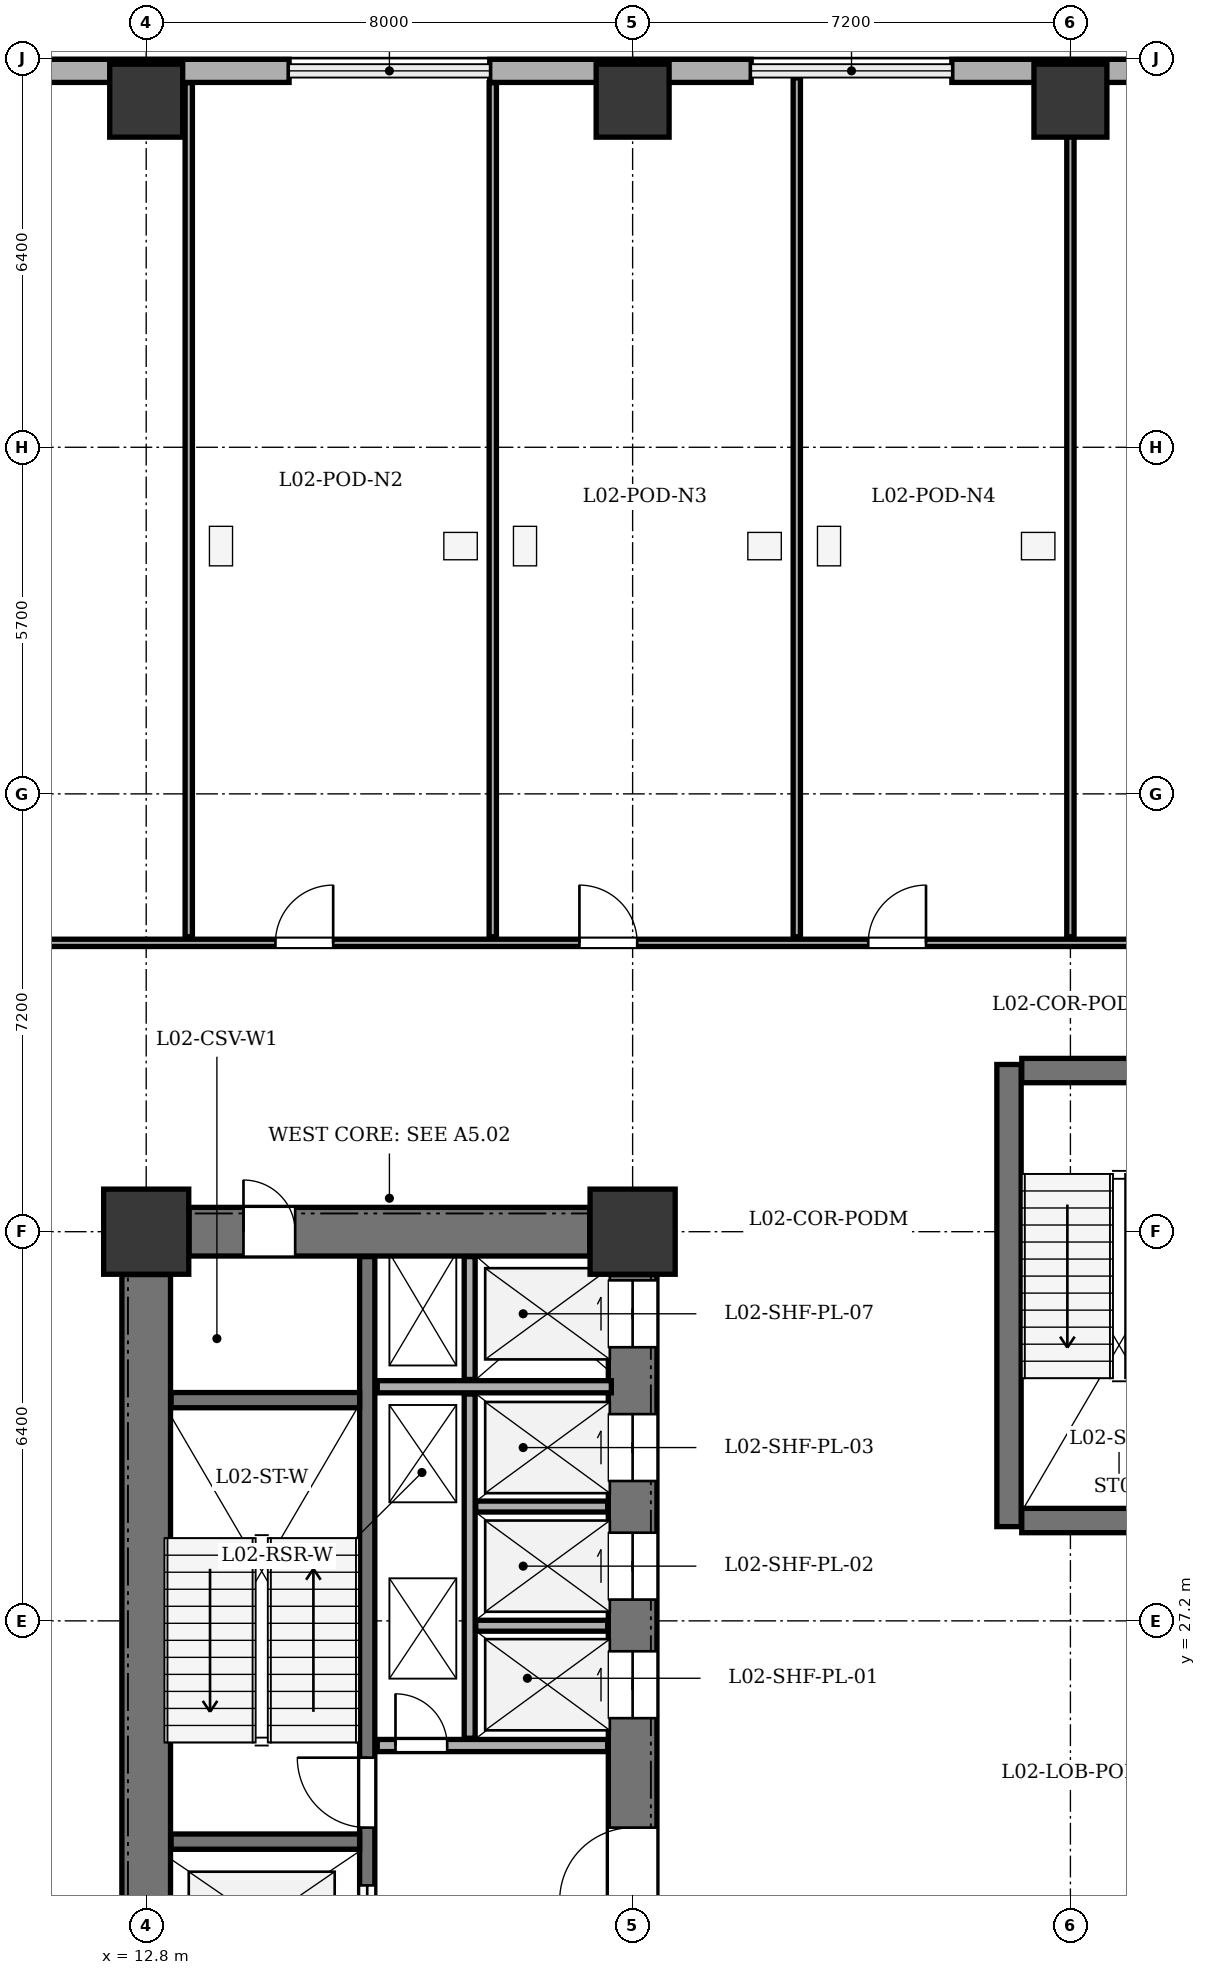
"""IFC4 building model, lengths in metres.
Left out: names, types, materials, properties, quantities, classifications, styles, units other than length and angle.
Written with IfcOpenShell. Run it as: python <this file> out.ifc"""

import sys

from ifc_helpers import new_model, si_unit, direction, frame, frame_2d, origin, origin_2d, place, context, subcontext, project, spatial, rectangle, extrude, element, fill, save


model = new_model("IFC4")
c1 = context("Model", 3, precision=1e-05, world=origin(), true_north=direction((0.0, 1.0)))
c2 = subcontext(c1, "Body", "Model", "MODEL_VIEW")
j1 = project(units=[si_unit("LENGTHUNIT", "METRE"), si_unit("PLANEANGLEUNIT", "RADIAN")], contexts=[c1])
p1 = place(None, origin())
s1 = spatial("IfcSite", under=j1, at=p1, CompositionType="ELEMENT")
p2 = place(p1, origin())
s2 = spatial("IfcBuilding", under=s1, at=p2, CompositionType="ELEMENT")
p3 = place(p2, frame((0.0, 0.0, 9.9)))
s3 = spatial("IfcBuildingStorey", under=s2, at=p3, CompositionType="ELEMENT", Elevation=9.9)
for number, where, z_axis, x_axis in (
    (1, (12.8, 33.6, 0.0), (0.0, 0.0, 1.0), (1.0, 0.0, 0.0)),
    (2, (20.8, 33.6, 0.0), (0.0, 0.0, 1.0), (1.0, 0.0, 0.0)),
):
    element("IfcColumn", number, at=place(p3, frame(where, z_axis=z_axis, x_axis=x_axis)), inside=s3, PredefinedType="COLUMN", context=c2, shape_type="SweptSolid", body=[
        extrude(rectangle(XDim=1.4, YDim=1.4, at=origin_2d()), origin(), (0.0, 0.0, 1.0), 4.5),
    ])
for number, where, z_axis, x_axis in (
    (3, (12.8, 52.2, 0.0), (0.0, 0.0, 1.0), (1.0, 0.0, 0.0)),
    (4, (20.8, 52.2, 0.0), (0.0, 0.0, 1.0), (1.0, 0.0, 0.0)),
    (5, (28.0, 52.2, 0.0), (0.0, 0.0, 1.0), (1.0, 0.0, 0.0)),
):
    element("IfcColumn", number, at=place(p3, frame(where, z_axis=z_axis, x_axis=x_axis)), inside=s3, PredefinedType="COLUMN", context=c2, shape_type="SweptSolid", body=[
        extrude(rectangle(XDim=1.2, YDim=1.2, at=origin_2d()), origin(), (0.0, 0.0, 1.0), 4.5),
    ])
p4 = place(p3, frame((5.4, 52.69, 0.0), z_axis=(0.0, 0.0, 1.0), x_axis=(1.0, 0.0, 0.0)))
e6 = element("IfcWall", 6, at=p4, inside=s3, PredefinedType="STANDARD", context=c2, shape_type="SweptSolid", body=[
    extrude(rectangle(XDim=9.75, YDim=0.38, at=frame_2d((4.875, 0.0))), origin(), (0.0, 0.0, 1.0), 4.18),
])
p5 = place(p3, frame((18.45, 52.69, 0.0), z_axis=(0.0, 0.0, 1.0), x_axis=(1.0, 0.0, 0.0)))
e7 = element("IfcWall", 7, at=p5, inside=s3, PredefinedType="STANDARD", context=c2, shape_type="SweptSolid", body=[
    extrude(rectangle(XDim=4.3, YDim=0.38, at=frame_2d((2.15, 0.0))), origin(), (0.0, 0.0, 1.0), 4.18),
])
p6 = place(p3, frame((26.05, 52.69, 0.0), z_axis=(0.0, 0.0, 1.0), x_axis=(1.0, 0.0, 0.0)))
e8 = element("IfcWall", 8, at=p6, inside=s3, PredefinedType="STANDARD", context=c2, shape_type="SweptSolid", body=[
    extrude(rectangle(XDim=28.95, YDim=0.38, at=frame_2d((14.475, 0.0))), origin(), (0.0, 0.0, 1.0), 4.18),
])
p7 = place(p3, frame((12.8, 21.505, 0.0), z_axis=(0.0, 0.0, 1.0), x_axis=(0.0, 1.0, 0.0)))
e9 = element("IfcWall", 9, at=p7, inside=s3, PredefinedType="SHEAR", context=c2, shape_type="SweptSolid", body=[
    extrude(rectangle(XDim=11.39, YDim=0.8, at=frame_2d((5.695, 0.0))), origin(), (0.0, 0.0, 1.0), 4.18),
])
p8 = place(p3, frame((13.505, 33.6, 0.0), z_axis=(0.0, 0.0, 1.0), x_axis=(1.0, 0.0, 0.0)))
e10 = element("IfcWall", 10, at=p8, inside=s3, PredefinedType="SHEAR", context=c2, shape_type="SweptSolid", body=[
    extrude(rectangle(XDim=6.59, YDim=0.8, at=frame_2d((3.295, 0.0))), origin(), (0.0, 0.0, 1.0), 4.18),
])
p9 = place(p8, frame((0.895, 0.0, 0.0)))
e11 = element("IfcOpeningElement", 11, at=p9, cuts=e10, PredefinedType="OPENING", context=c2, shape_type="SweptSolid", body=[
    extrude(rectangle(XDim=0.85, YDim=2.02, at=frame_2d((0.425, 1.01))), frame((0.0, 0.41, 0.0), z_axis=(0.0, -1.0, 0.0), x_axis=(1.0, 0.0, 0.0)), (0.0, 0.0, 1.0), 0.82),
])
p10 = place(p3, frame((20.8, 21.505, 0.0), z_axis=(0.0, 0.0, 1.0), x_axis=(0.0, 1.0, 0.0)))
e12 = element("IfcWall", 12, at=p10, inside=s3, PredefinedType="SHEAR", context=c2, shape_type="SweptSolid", body=[
    extrude(rectangle(XDim=11.39, YDim=0.8, at=frame_2d((5.695, 0.0))), origin(), (0.0, 0.0, 1.0), 4.18),
])
p11 = place(p10, frame((1.095, 0.0, 0.0)))
e13 = element("IfcOpeningElement", 13, at=p11, cuts=e12, PredefinedType="OPENING", context=c2, shape_type="SweptSolid", body=[
    extrude(rectangle(XDim=1.2, YDim=2.15, at=frame_2d((0.6, 1.075))), frame((0.0, 0.41, 0.0), z_axis=(0.0, -1.0, 0.0), x_axis=(1.0, 0.0, 0.0)), (0.0, 0.0, 1.0), 0.82),
])
p12 = place(p10, frame((4.095, 0.0, 0.0)))
e14 = element("IfcOpeningElement", 14, at=p12, cuts=e12, PredefinedType="OPENING", context=c2, shape_type="SweptSolid", body=[
    extrude(rectangle(XDim=1.1, YDim=2.1, at=frame_2d((0.55, 1.05))), frame((0.0, 0.41, 0.0), z_axis=(0.0, -1.0, 0.0), x_axis=(1.0, 0.0, 0.0)), (0.0, 0.0, 1.0), 0.82),
])
p13 = place(p10, frame((6.045, 0.0, 0.0)))
e15 = element("IfcOpeningElement", 15, at=p13, cuts=e12, PredefinedType="OPENING", context=c2, shape_type="SweptSolid", body=[
    extrude(rectangle(XDim=1.1, YDim=2.1, at=frame_2d((0.55, 1.05))), frame((0.0, 0.41, 0.0), z_axis=(0.0, -1.0, 0.0), x_axis=(1.0, 0.0, 0.0)), (0.0, 0.0, 1.0), 0.82),
])
p14 = place(p10, frame((7.995, 0.0, 0.0)))
e16 = element("IfcOpeningElement", 16, at=p14, cuts=e12, PredefinedType="OPENING", context=c2, shape_type="SweptSolid", body=[
    extrude(rectangle(XDim=1.1, YDim=2.1, at=frame_2d((0.55, 1.05))), frame((0.0, 0.41, 0.0), z_axis=(0.0, -1.0, 0.0), x_axis=(1.0, 0.0, 0.0)), (0.0, 0.0, 1.0), 0.82),
])
p15 = place(p10, frame((10.195, 0.0, 0.0)))
e17 = element("IfcOpeningElement", 17, at=p15, cuts=e12, PredefinedType="OPENING", context=c2, shape_type="SweptSolid", body=[
    extrude(rectangle(XDim=1.1, YDim=2.1, at=frame_2d((0.55, 1.05))), frame((0.0, 0.41, 0.0), z_axis=(0.0, -1.0, 0.0), x_axis=(1.0, 0.0, 0.0)), (0.0, 0.0, 1.0), 0.82),
])
p16 = place(p3, frame((16.435, 21.21, 0.0), z_axis=(0.0, 0.0, 1.0), x_axis=(0.0, 1.0, 0.0)))
e18 = element("IfcWall", 18, at=p16, inside=s3, PredefinedType="SHEAR", context=c2, shape_type="SweptSolid", body=[
    extrude(rectangle(XDim=11.98, YDim=0.25, at=frame_2d((5.99, 0.0))), origin(), (0.0, 0.0, 1.0), 4.18),
])
p17 = place(p16, frame((0.44, 0.0, 0.0)))
e19 = element("IfcOpeningElement", 19, at=p17, cuts=e18, PredefinedType="OPENING", context=c2, shape_type="SweptSolid", body=[
    extrude(rectangle(XDim=1.2, YDim=2.15, at=frame_2d((0.6, 1.075))), frame((0.0, 0.135, 0.0), z_axis=(0.0, -1.0, 0.0), x_axis=(1.0, 0.0, 0.0)), (0.0, 0.0, 1.0), 0.27),
])
p18 = place(p16, frame((2.59, 0.0, 0.0)))
e20 = element("IfcOpeningElement", 20, at=p18, cuts=e18, PredefinedType="OPENING", context=c2, shape_type="SweptSolid", body=[
    extrude(rectangle(XDim=1.15, YDim=2.15, at=frame_2d((0.575, 1.075))), frame((0.0, 0.135, 0.0), z_axis=(0.0, -1.0, 0.0), x_axis=(1.0, 0.0, 0.0)), (0.0, 0.0, 1.0), 0.27),
])
for number, where, z_axis, x_axis in (
    (21, (13.21, 23.57, 0.0), (0.0, 0.0, 1.0), (1.0, 0.0, 0.0)),
    (22, (13.21, 30.83, 0.0), (0.0, 0.0, 1.0), (1.0, 0.0, 0.0)),
):
    element("IfcWall", number, at=place(p3, frame(where, z_axis=z_axis, x_axis=x_axis)), inside=s3, PredefinedType="SHEAR", context=c2, shape_type="SweptSolid", body=[
        extrude(rectangle(XDim=3.1, YDim=0.25, at=frame_2d((1.55, 0.0))), origin(), (0.0, 0.0, 1.0), 4.18),
    ])
p19 = place(p3, frame((16.6, 25.15, 0.0), z_axis=(0.0, 0.0, 1.0), x_axis=(1.0, 0.0, 0.0)))
e23 = element("IfcWall", 23, at=p19, inside=s3, PredefinedType="SOLIDWALL", context=c2, shape_type="SweptSolid", body=[
    extrude(rectangle(XDim=3.79, YDim=0.2, at=frame_2d((1.895, 0.0))), origin(), (0.0, 0.0, 1.0), 4.18),
])
p20 = place(p19, frame((0.3, 0.0, 0.0)))
e24 = element("IfcOpeningElement", 24, at=p20, cuts=e23, PredefinedType="OPENING", context=c2, shape_type="SweptSolid", body=[
    extrude(rectangle(XDim=0.85, YDim=2.02, at=frame_2d((0.425, 1.01))), frame((0.0, 0.11, 0.0), z_axis=(0.0, -1.0, 0.0), x_axis=(1.0, 0.0, 0.0)), (0.0, 0.0, 1.0), 0.22),
])
p21 = place(p3, frame((16.6, 31.05, 0.0), z_axis=(0.0, 0.0, 1.0), x_axis=(1.0, 0.0, 0.0)))
e25 = element("IfcWall", 25, at=p21, inside=s3, PredefinedType="SOLIDWALL", context=c2, shape_type="SweptSolid", body=[
    extrude(rectangle(XDim=3.85, YDim=0.2, at=frame_2d((1.925, 0.0))), origin(), (0.0, 0.0, 1.0), 4.18),
])
p22 = place(p3, frame((18.12, 25.27, 0.0), z_axis=(0.0, 0.0, 1.0), x_axis=(0.0, 1.0, 0.0)))
e26 = element("IfcWall", 26, at=p22, inside=s3, PredefinedType="PARTITIONING", context=c2, shape_type="SweptSolid", body=[
    extrude(rectangle(XDim=5.66, YDim=0.18, at=frame_2d((2.83, 0.0))), origin(), (0.0, 0.0, 1.0), 4.18),
])
p23 = place(p3, frame((18.12, 31.17, 0.0), z_axis=(0.0, 0.0, 1.0), x_axis=(0.0, 1.0, 0.0)))
e27 = element("IfcWall", 27, at=p23, inside=s3, PredefinedType="PARTITIONING", context=c2, shape_type="SweptSolid", body=[
    extrude(rectangle(XDim=2.02, YDim=0.18, at=frame_2d((1.01, 0.0))), origin(), (0.0, 0.0, 1.0), 4.18),
])
for number, where, z_axis, x_axis in (
    (28, (18.22, 27.12, 0.0), (0.0, 0.0, 1.0), (1.0, 0.0, 0.0)),
    (29, (18.22, 29.08, 0.0), (0.0, 0.0, 1.0), (1.0, 0.0, 0.0)),
):
    element("IfcWall", number, at=place(p3, frame(where, z_axis=z_axis, x_axis=x_axis)), inside=s3, PredefinedType="PARTITIONING", context=c2, shape_type="SweptSolid", body=[
        extrude(rectangle(XDim=2.17, YDim=0.18, at=frame_2d((1.085, 0.0))), origin(), (0.0, 0.0, 1.0), 4.18),
    ])
p24 = place(p3, frame((26.99, 28.75, 0.0), z_axis=(0.0, 0.0, 1.0), x_axis=(0.0, 1.0, 0.0)))
e30 = element("IfcWall", 30, at=p24, inside=s3, PredefinedType="SHEAR", context=c2, shape_type="SweptSolid", body=[
    extrude(rectangle(XDim=7.6, YDim=0.4, at=frame_2d((3.8, 0.0))), origin(), (0.0, 0.0, 1.0), 4.18),
])
for number, where, z_axis, x_axis in (
    (31, (27.2, 28.85, 0.0), (0.0, 0.0, 1.0), (1.0, 0.0, 0.0)),
    (32, (27.2, 36.25, 0.0), (0.0, 0.0, 1.0), (1.0, 0.0, 0.0)),
):
    element("IfcWall", number, at=place(p3, frame(where, z_axis=z_axis, x_axis=x_axis)), inside=s3, PredefinedType="SHEAR", context=c2, shape_type="SweptSolid", body=[
        extrude(rectangle(XDim=3.2, YDim=0.4, at=frame_2d((1.6, 0.0))), origin(), (0.0, 0.0, 1.0), 4.18),
    ])
p25 = place(p3, frame((2.805, 38.35, 0.0), z_axis=(0.0, 0.0, 1.0), x_axis=(1.0, 0.0, 0.0)))
e33 = element("IfcWall", 33, at=p25, inside=s3, PredefinedType="PARTITIONING", context=c2, shape_type="SweptSolid", body=[
    extrude(rectangle(XDim=54.79, YDim=0.12, at=frame_2d((27.395, 0.0))), origin(), (0.0, 0.0, 1.0), 4.18),
])
p26 = place(p25, frame((4.57, 0.0, 0.0)))
e34 = element("IfcOpeningElement", 34, at=p26, cuts=e33, PredefinedType="OPENING", context=c2, shape_type="SweptSolid", body=[
    extrude(rectangle(XDim=0.95, YDim=2.1, at=frame_2d((0.475, 1.05))), frame((0.0, 0.07, 0.0), z_axis=(0.0, -1.0, 0.0), x_axis=(1.0, 0.0, 0.0)), (0.0, 0.0, 1.0), 0.14),
])
p27 = place(p25, frame((12.12, 0.0, 0.0)))
e35 = element("IfcOpeningElement", 35, at=p27, cuts=e33, PredefinedType="OPENING", context=c2, shape_type="SweptSolid", body=[
    extrude(rectangle(XDim=0.95, YDim=2.1, at=frame_2d((0.475, 1.05))), frame((0.0, 0.07, 0.0), z_axis=(0.0, -1.0, 0.0), x_axis=(1.0, 0.0, 0.0)), (0.0, 0.0, 1.0), 0.14),
])
p28 = place(p25, frame((17.12, 0.0, 0.0)))
e36 = element("IfcOpeningElement", 36, at=p28, cuts=e33, PredefinedType="OPENING", context=c2, shape_type="SweptSolid", body=[
    extrude(rectangle(XDim=0.95, YDim=2.1, at=frame_2d((0.475, 1.05))), frame((0.0, 0.07, 0.0), z_axis=(0.0, -1.0, 0.0), x_axis=(1.0, 0.0, 0.0)), (0.0, 0.0, 1.0), 0.14),
])
p29 = place(p25, frame((21.87, 0.0, 0.0)))
e37 = element("IfcOpeningElement", 37, at=p29, cuts=e33, PredefinedType="OPENING", context=c2, shape_type="SweptSolid", body=[
    extrude(rectangle(XDim=0.95, YDim=2.1, at=frame_2d((0.475, 1.05))), frame((0.0, 0.07, 0.0), z_axis=(0.0, -1.0, 0.0), x_axis=(1.0, 0.0, 0.0)), (0.0, 0.0, 1.0), 0.14),
])
p30 = place(p25, frame((29.87, 0.0, 0.0)))
e38 = element("IfcOpeningElement", 38, at=p30, cuts=e33, PredefinedType="OPENING", context=c2, shape_type="SweptSolid", body=[
    extrude(rectangle(XDim=0.95, YDim=2.1, at=frame_2d((0.475, 1.05))), frame((0.0, 0.07, 0.0), z_axis=(0.0, -1.0, 0.0), x_axis=(1.0, 0.0, 0.0)), (0.0, 0.0, 1.0), 0.14),
])
p31 = place(p25, frame((40.37, 0.0, 0.0)))
e39 = element("IfcOpeningElement", 39, at=p31, cuts=e33, PredefinedType="OPENING", context=c2, shape_type="SweptSolid", body=[
    extrude(rectangle(XDim=0.95, YDim=2.1, at=frame_2d((0.475, 1.05))), frame((0.0, 0.07, 0.0), z_axis=(0.0, -1.0, 0.0), x_axis=(1.0, 0.0, 0.0)), (0.0, 0.0, 1.0), 0.14),
])
p32 = place(p25, frame((49.12, 0.0, 0.0)))
e40 = element("IfcOpeningElement", 40, at=p32, cuts=e33, PredefinedType="OPENING", context=c2, shape_type="SweptSolid", body=[
    extrude(rectangle(XDim=0.95, YDim=2.1, at=frame_2d((0.475, 1.05))), frame((0.0, 0.07, 0.0), z_axis=(0.0, -1.0, 0.0), x_axis=(1.0, 0.0, 0.0)), (0.0, 0.0, 1.0), 0.14),
])
for number, where, z_axis, x_axis in (
    (41, (13.5, 38.45, 0.0), (0.0, 0.0, 1.0), (0.0, 1.0, 0.0)),
    (42, (18.5, 38.45, 0.0), (0.0, 0.0, 1.0), (0.0, 1.0, 0.0)),
):
    element("IfcWall", number, at=place(p3, frame(where, z_axis=z_axis, x_axis=x_axis)), inside=s3, PredefinedType="PARTITIONING", context=c2, shape_type="SweptSolid", body=[
        extrude(rectangle(XDim=14.045, YDim=0.12, at=frame_2d((7.022, 0.0))), origin(), (0.0, 0.0, 1.0), 4.18),
    ])
p33 = place(p3, frame((23.5, 38.45, 0.0), z_axis=(0.0, 0.0, 1.0), x_axis=(0.0, 1.0, 0.0)))
e43 = element("IfcWall", 43, at=p33, inside=s3, PredefinedType="PARTITIONING", context=c2, shape_type="SweptSolid", body=[
    extrude(rectangle(XDim=14.125, YDim=0.12, at=frame_2d((7.062, 0.0))), origin(), (0.0, 0.0, 1.0), 4.18),
])
p34 = place(p3, frame((28.0, 38.45, 0.0), z_axis=(0.0, 0.0, 1.0), x_axis=(0.0, 1.0, 0.0)))
e44 = element("IfcWall", 44, at=p34, inside=s3, PredefinedType="PARTITIONING", context=c2, shape_type="SweptSolid", body=[
    extrude(rectangle(XDim=14.045, YDim=0.12, at=frame_2d((7.022, 0.0))), origin(), (0.0, 0.0, 1.0), 4.18),
])
p35 = place(p9, origin())
e45 = element("IfcDoor", 45, at=p35, inside=s3, OperationType="SINGLE_SWING_LEFT", PredefinedType="DOOR", context=c2, shape_type="SweptSolid", body=[
    extrude(rectangle(XDim=0.85, YDim=2.02, at=frame_2d((0.425, 1.01))), frame((0.0, 0.025, 0.0), z_axis=(0.0, -1.0, 0.0), x_axis=(1.0, 0.0, 0.0)), (0.0, 0.0, 1.0), 0.05),
])
fill(e11, e45)
p36 = place(p11, origin())
e46 = element("IfcDoor", 46, at=p36, inside=s3, OperationType="SINGLE_SWING_LEFT", PredefinedType="DOOR", context=c2, shape_type="SweptSolid", body=[
    extrude(rectangle(XDim=1.2, YDim=2.15, at=frame_2d((0.6, 1.075))), frame((0.0, 0.025, 0.0), z_axis=(0.0, -1.0, 0.0), x_axis=(1.0, 0.0, 0.0)), (0.0, 0.0, 1.0), 0.05),
])
fill(e13, e46)
p37 = place(p12, origin())
e47 = element("IfcDoor", 47, at=p37, inside=s3, OperationType="DOUBLE_DOOR_SLIDING", PredefinedType="DOOR", context=c2, shape_type="SweptSolid", body=[
    extrude(rectangle(XDim=1.1, YDim=2.1, at=frame_2d((0.55, 1.05))), frame((0.0, 0.025, 0.0), z_axis=(0.0, -1.0, 0.0), x_axis=(1.0, 0.0, 0.0)), (0.0, 0.0, 1.0), 0.05),
])
fill(e14, e47)
p38 = place(p13, origin())
e48 = element("IfcDoor", 48, at=p38, inside=s3, OperationType="DOUBLE_DOOR_SLIDING", PredefinedType="DOOR", context=c2, shape_type="SweptSolid", body=[
    extrude(rectangle(XDim=1.1, YDim=2.1, at=frame_2d((0.55, 1.05))), frame((0.0, 0.025, 0.0), z_axis=(0.0, -1.0, 0.0), x_axis=(1.0, 0.0, 0.0)), (0.0, 0.0, 1.0), 0.05),
])
fill(e15, e48)
p39 = place(p14, origin())
e49 = element("IfcDoor", 49, at=p39, inside=s3, OperationType="DOUBLE_DOOR_SLIDING", PredefinedType="DOOR", context=c2, shape_type="SweptSolid", body=[
    extrude(rectangle(XDim=1.1, YDim=2.1, at=frame_2d((0.55, 1.05))), frame((0.0, 0.025, 0.0), z_axis=(0.0, -1.0, 0.0), x_axis=(1.0, 0.0, 0.0)), (0.0, 0.0, 1.0), 0.05),
])
fill(e16, e49)
p40 = place(p15, origin())
e50 = element("IfcDoor", 50, at=p40, inside=s3, OperationType="DOUBLE_DOOR_SLIDING", PredefinedType="DOOR", context=c2, shape_type="SweptSolid", body=[
    extrude(rectangle(XDim=1.1, YDim=2.1, at=frame_2d((0.55, 1.05))), frame((0.0, 0.025, 0.0), z_axis=(0.0, -1.0, 0.0), x_axis=(1.0, 0.0, 0.0)), (0.0, 0.0, 1.0), 0.05),
])
fill(e17, e50)
p41 = place(p17, origin())
e51 = element("IfcDoor", 51, at=p41, inside=s3, OperationType="DOUBLE_DOOR_SLIDING", PredefinedType="DOOR", context=c2, shape_type="SweptSolid", body=[
    extrude(rectangle(XDim=1.2, YDim=2.15, at=frame_2d((0.6, 1.075))), frame((0.0, 0.025, 0.0), z_axis=(0.0, -1.0, 0.0), x_axis=(1.0, 0.0, 0.0)), (0.0, 0.0, 1.0), 0.05),
])
fill(e19, e51)
p42 = place(p18, origin())
e52 = element("IfcDoor", 52, at=p42, inside=s3, OperationType="SINGLE_SWING_RIGHT", PredefinedType="DOOR", context=c2, shape_type="SweptSolid", body=[
    extrude(rectangle(XDim=1.15, YDim=2.15, at=frame_2d((0.575, 1.075))), frame((0.0, 0.025, 0.0), z_axis=(0.0, -1.0, 0.0), x_axis=(1.0, 0.0, 0.0)), (0.0, 0.0, 1.0), 0.05),
])
fill(e20, e52)
p43 = place(p20, origin())
e53 = element("IfcDoor", 53, at=p43, inside=s3, OperationType="SINGLE_SWING_LEFT", PredefinedType="DOOR", context=c2, shape_type="SweptSolid", body=[
    extrude(rectangle(XDim=0.85, YDim=2.02, at=frame_2d((0.425, 1.01))), frame((0.0, 0.025, 0.0), z_axis=(0.0, -1.0, 0.0), x_axis=(1.0, 0.0, 0.0)), (0.0, 0.0, 1.0), 0.05),
])
fill(e24, e53)
p44 = place(p27, origin())
e54 = element("IfcDoor", 54, at=p44, inside=s3, OperationType="SINGLE_SWING_RIGHT", PredefinedType="DOOR", context=c2, shape_type="SweptSolid", body=[
    extrude(rectangle(XDim=0.95, YDim=2.1, at=frame_2d((0.475, 1.05))), frame((0.0, 0.025, 0.0), z_axis=(0.0, -1.0, 0.0), x_axis=(1.0, 0.0, 0.0)), (0.0, 0.0, 1.0), 0.05),
])
fill(e35, e54)
p45 = place(p28, origin())
e55 = element("IfcDoor", 55, at=p45, inside=s3, OperationType="SINGLE_SWING_LEFT", PredefinedType="DOOR", context=c2, shape_type="SweptSolid", body=[
    extrude(rectangle(XDim=0.95, YDim=2.1, at=frame_2d((0.475, 1.05))), frame((0.0, 0.025, 0.0), z_axis=(0.0, -1.0, 0.0), x_axis=(1.0, 0.0, 0.0)), (0.0, 0.0, 1.0), 0.05),
])
fill(e36, e55)
p46 = place(p29, origin())
e56 = element("IfcDoor", 56, at=p46, inside=s3, OperationType="SINGLE_SWING_RIGHT", PredefinedType="DOOR", context=c2, shape_type="SweptSolid", body=[
    extrude(rectangle(XDim=0.95, YDim=2.1, at=frame_2d((0.475, 1.05))), frame((0.0, 0.025, 0.0), z_axis=(0.0, -1.0, 0.0), x_axis=(1.0, 0.0, 0.0)), (0.0, 0.0, 1.0), 0.05),
])
fill(e37, e56)
save(model, sys.argv[1])
